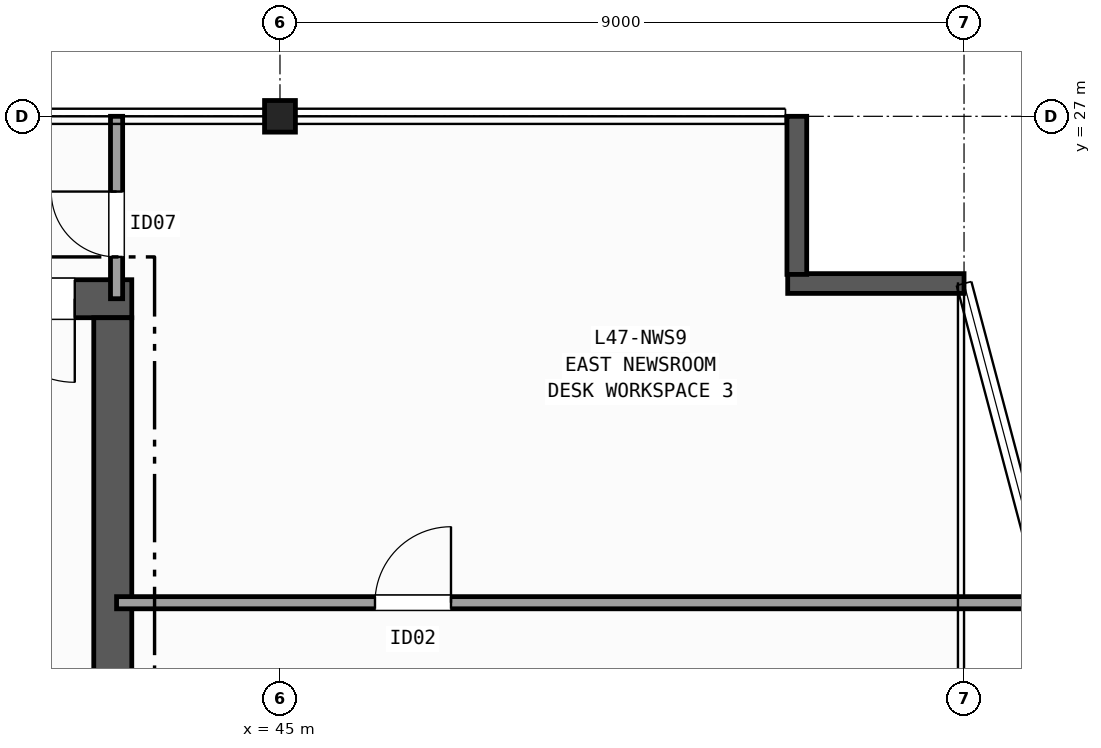
"""IFC4 building model, lengths in metres.
Left out: names, types, materials, properties, quantities, classifications, styles, units other than length and angle.
Written with IfcOpenShell. Run it as: python <this file> out.ifc"""

import sys

from ifc_helpers import new_model, si_unit, direction, frame, frame_2d, origin, origin_2d, place, context, subcontext, project, spatial, rectangle, i_section, extrude, element, fill, save


model = new_model("IFC4")
c1 = context("Model", 3, precision=1e-05, world=origin(), true_north=direction((0.0, 1.0)))
c2 = subcontext(c1, "Body", "Model", "MODEL_VIEW")
j1 = project(units=[si_unit("LENGTHUNIT", "METRE"), si_unit("PLANEANGLEUNIT", "RADIAN")], contexts=[c1])
p1 = place(None, origin())
s1 = spatial("IfcSite", under=j1, at=p1, CompositionType="ELEMENT")
p2 = place(p1, origin())
s2 = spatial("IfcBuilding", under=s1, at=p2, CompositionType="ELEMENT")
p3 = place(p2, frame((0.0, 0.0, 189.0)))
s3 = spatial("IfcBuildingStorey", under=s2, at=p3, CompositionType="ELEMENT", Elevation=189.0)
p4 = place(p3, frame((45.0, 27.0, 0.0), z_axis=(0.0, 0.0, 1.0), x_axis=(1.0, 0.0, 0.0)))
e1 = element("IfcColumn", 1, at=p4, inside=s3, PredefinedType="COLUMN", context=c2, shape_type="SweptSolid", body=[
    extrude(i_section(OverallWidth=0.406, OverallDepth=0.416, WebThickness=0.03, FlangeThickness=0.048, FilletRadius=0.015, at=origin_2d()), origin(), (0.0, 0.0, 1.0), 3.7),
])
p5 = place(p3, frame((54.0, 24.8, 0.0), z_axis=(0.0, 0.0, 1.0), x_axis=(-1.0, 0.0, 0.0)))
e2 = element("IfcWall", 2, at=p5, inside=s3, PredefinedType="SOLIDWALL", context=c2, shape_type="SweptSolid", body=[
    extrude(rectangle(XDim=2.32, YDim=0.26, at=frame_2d((1.16, 0.0))), origin(), (0.0, 0.0, 1.0), 3.42),
])
p6 = place(p3, frame((51.8, 24.92, 0.0), z_axis=(0.0, 0.0, 1.0), x_axis=(0.0, 1.0, 0.0)))
e3 = element("IfcWall", 3, at=p6, inside=s3, PredefinedType="SOLIDWALL", context=c2, shape_type="SweptSolid", body=[
    extrude(rectangle(XDim=2.08, YDim=0.26, at=frame_2d((1.04, 0.0))), origin(), (0.0, 0.0, 1.0), 3.42),
])
p7 = place(p3, frame((43.05, 24.6, 0.0), z_axis=(0.0, 0.0, 1.0), x_axis=(-1.0, 0.0, 0.0)))
e4 = element("IfcWall", 4, at=p7, inside=s3, PredefinedType="SHEAR", context=c2, shape_type="SweptSolid", body=[
    extrude(rectangle(XDim=13.9, YDim=0.5, at=frame_2d((6.95, 0.0))), origin(), (0.0, 0.0, 1.0), 3.42),
])
p8 = place(p7, frame((0.75, 0.0, 0.0)))
e5 = element("IfcOpeningElement", 5, at=p8, cuts=e4, PredefinedType="OPENING", context=c2, shape_type="SweptSolid", body=[
    extrude(rectangle(XDim=1.1, YDim=2.15, at=frame_2d((0.55, 1.075))), frame((0.0, 0.26, 0.0), z_axis=(0.0, -1.0, 0.0), x_axis=(1.0, 0.0, 0.0)), (0.0, 0.0, 1.0), 0.52),
])
p9 = place(p7, frame((2.7, 0.0, 0.0)))
e6 = element("IfcOpeningElement", 6, at=p9, cuts=e4, PredefinedType="OPENING", context=c2, shape_type="SweptSolid", body=[
    extrude(rectangle(XDim=0.9, YDim=2.1, at=frame_2d((0.45, 1.05))), frame((0.0, 0.26, 0.0), z_axis=(0.0, -1.0, 0.0), x_axis=(1.0, 0.0, 0.0)), (0.0, 0.0, 1.0), 0.52),
])
p10 = place(p7, frame((4.6, 0.0, 0.0)))
e7 = element("IfcOpeningElement", 7, at=p10, cuts=e4, PredefinedType="OPENING", context=c2, shape_type="SweptSolid", body=[
    extrude(rectangle(XDim=0.9, YDim=2.1, at=frame_2d((0.45, 1.05))), frame((0.0, 0.26, 0.0), z_axis=(0.0, -1.0, 0.0), x_axis=(1.0, 0.0, 0.0)), (0.0, 0.0, 1.0), 0.52),
])
p11 = place(p3, frame((42.8, 11.45, 0.0), z_axis=(0.0, 0.0, 1.0), x_axis=(0.0, 1.0, 0.0)))
e8 = element("IfcWall", 8, at=p11, inside=s3, PredefinedType="SHEAR", context=c2, shape_type="SweptSolid", body=[
    extrude(rectangle(XDim=12.9, YDim=0.5, at=frame_2d((6.45, 0.0))), origin(), (0.0, 0.0, 1.0), 3.42),
])
p12 = place(p3, frame((42.85, 24.6, 0.0), z_axis=(0.0, 0.0, 1.0), x_axis=(0.0, 1.0, 0.0)))
e9 = element("IfcWall", 9, at=p12, inside=s3, PredefinedType="PARTITIONING", context=c2, shape_type="SweptSolid", body=[
    extrude(rectangle(XDim=2.4, YDim=0.16, at=frame_2d((1.2, 0.0))), origin(), (0.0, 0.0, 1.0), 2.634),
])
p13 = place(p12, frame((0.55, 0.0, 0.0)))
e10 = element("IfcOpeningElement", 10, at=p13, cuts=e9, PredefinedType="OPENING", context=c2, shape_type="SweptSolid", body=[
    extrude(rectangle(XDim=0.86, YDim=2.05, at=frame_2d((0.43, 1.025))), frame((0.0, 0.09, 0.0), z_axis=(0.0, -1.0, 0.0), x_axis=(1.0, 0.0, 0.0)), (0.0, 0.0, 1.0), 0.18),
])
p14 = place(p3, frame((42.85, 20.6, 0.0), z_axis=(0.0, 0.0, 1.0), x_axis=(1.0, 0.0, 0.0)))
e11 = element("IfcWall", 11, at=p14, inside=s3, PredefinedType="PARTITIONING", context=c2, shape_type="SweptSolid", body=[
    extrude(rectangle(XDim=12.262, YDim=0.16, at=frame_2d((6.131, 0.0))), origin(), (0.0, 0.0, 1.0), 3.42),
])
p15 = place(p14, frame((3.4, 0.0, 0.0)))
e12 = element("IfcOpeningElement", 12, at=p15, cuts=e11, PredefinedType="OPENING", context=c2, shape_type="SweptSolid", body=[
    extrude(rectangle(XDim=1.0, YDim=2.1, at=frame_2d((0.5, 1.05))), frame((0.0, 0.09, 0.0), z_axis=(0.0, -1.0, 0.0), x_axis=(1.0, 0.0, 0.0)), (0.0, 0.0, 1.0), 0.18),
])
p16 = place(p8, origin())
e13 = element("IfcDoor", 13, at=p16, inside=s3, OperationType="SINGLE_SWING_LEFT", PredefinedType="DOOR", context=c2, shape_type="SweptSolid", body=[
    extrude(rectangle(XDim=1.1, YDim=2.15, at=frame_2d((0.55, 1.075))), frame((0.0, 0.025, 0.0), z_axis=(0.0, -1.0, 0.0), x_axis=(1.0, 0.0, 0.0)), (0.0, 0.0, 1.0), 0.05),
])
fill(e5, e13)
p17 = place(p13, origin())
e14 = element("IfcDoor", 14, at=p17, inside=s3, OperationType="SINGLE_SWING_RIGHT", PredefinedType="DOOR", context=c2, shape_type="SweptSolid", body=[
    extrude(rectangle(XDim=0.86, YDim=2.05, at=frame_2d((0.43, 1.025))), frame((0.0, 0.025, 0.0), z_axis=(0.0, -1.0, 0.0), x_axis=(1.0, 0.0, 0.0)), (0.0, 0.0, 1.0), 0.05),
])
fill(e10, e14)
p18 = place(p15, origin())
e15 = element("IfcDoor", 15, at=p18, inside=s3, OperationType="SINGLE_SWING_RIGHT", PredefinedType="DOOR", context=c2, shape_type="SweptSolid", body=[
    extrude(rectangle(XDim=1.0, YDim=2.1, at=frame_2d((0.5, 1.05))), frame((0.0, 0.025, 0.0), z_axis=(0.0, -1.0, 0.0), x_axis=(1.0, 0.0, 0.0)), (0.0, 0.0, 1.0), 0.05),
])
fill(e12, e15)
save(model, sys.argv[1])
